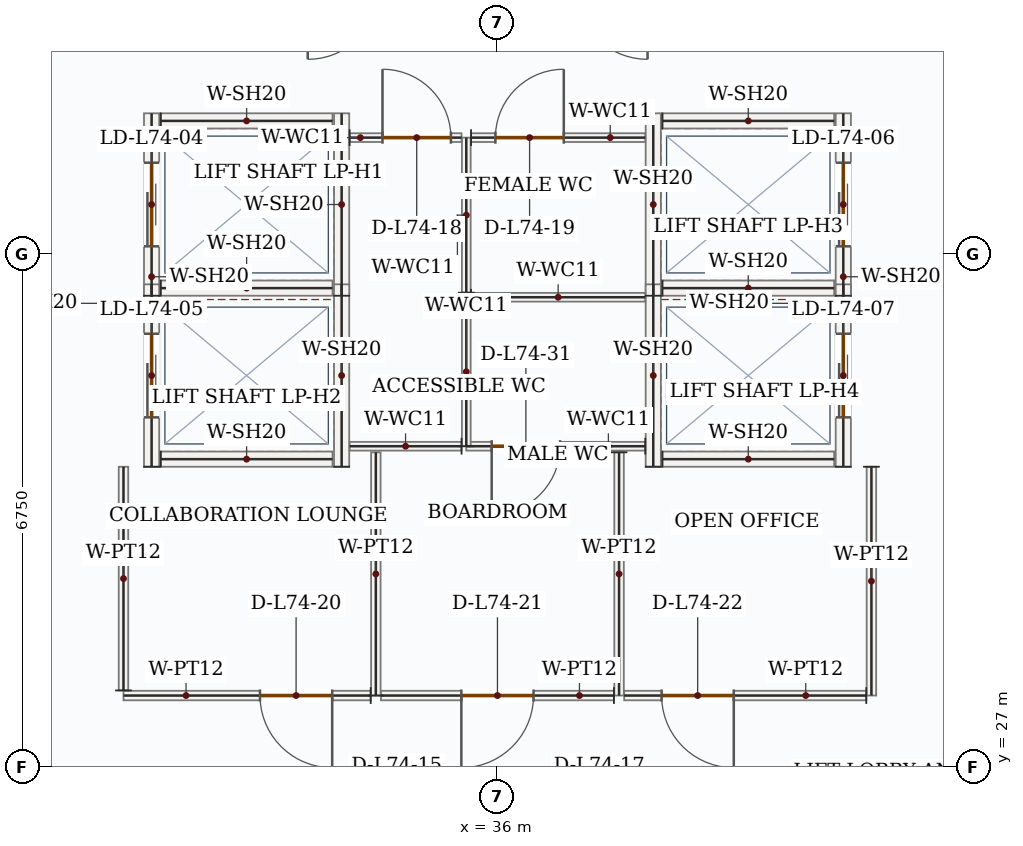
"""IFC4 building model, lengths in metres.
Left out: names, types, materials, properties, quantities, classifications, styles, units other than length and angle.
Written with IfcOpenShell. Run it as: python <this file> out.ifc"""

import sys

from ifc_helpers import new_model, si_unit, direction, frame, frame_2d, origin, place, context, subcontext, project, spatial, rectangle, extrude, source, transform, mapped, element, fill, save


model = new_model("IFC4")
c1 = context("Model", 3, precision=1e-05, world=origin(), true_north=direction((0.0, 1.0)))
c2 = subcontext(c1, "Body", "Model", "MODEL_VIEW")
j1 = project(units=[si_unit("LENGTHUNIT", "METRE"), si_unit("PLANEANGLEUNIT", "RADIAN")], contexts=[c1])
p1 = place(None, origin())
s1 = spatial("IfcSite", under=j1, at=p1, CompositionType="ELEMENT")
p2 = place(p1, origin())
s2 = spatial("IfcBuilding", under=s1, at=p2, CompositionType="ELEMENT")
p3 = place(p2, frame((0.0, 0.0, 306.6)))
s3 = spatial("IfcBuildingStorey", under=s2, at=p3, CompositionType="ELEMENT", Elevation=306.6)
p4 = place(p3, frame((31.45, 33.2, 0.0), z_axis=(0.0, 0.0, 1.0), x_axis=(0.0, 1.0, 0.0)))
e1 = element("IfcWall", 1, at=p4, inside=s3, PredefinedType="SOLIDWALL", context=c2, shape_type="SweptSolid", body=[
    extrude(rectangle(XDim=2.4, YDim=0.2, at=frame_2d((1.2, 0.0))), origin(), (0.0, 0.0, 1.0), 3.5),
])
p5 = place(p4, frame((0.65, 0.0, 0.0)))
e2 = element("IfcOpeningElement", 2, at=p5, cuts=e1, PredefinedType="OPENING", context=c2, shape_type="SweptSolid", body=[
    extrude(rectangle(XDim=1.1, YDim=2.15, at=frame_2d((0.55, 1.075))), frame((0.0, 0.11, 0.0), z_axis=(0.0, -1.0, 0.0), x_axis=(1.0, 0.0, 0.0)), (0.0, 0.0, 1.0), 0.22),
])
m1 = source(origin(), c2, "Body", "SweptSolid", [
    extrude(rectangle(XDim=2.4, YDim=0.2, at=frame_2d((1.2, 0.0))), origin(), (0.0, 0.0, 1.0), 3.5),
])
p6 = place(p3, frame((33.95, 33.2, 0.0), z_axis=(0.0, 0.0, 1.0), x_axis=(0.0, 1.0, 0.0)))
e3 = element("IfcWall", 3, at=p6, inside=s3, PredefinedType="SOLIDWALL", context=c2, shape_type="MappedRepresentation", body=[
    mapped(m1, transform((0.0, 0.0, 0.0), x_axis=(1.0, 0.0, 0.0), y_axis=(0.0, 1.0, 0.0), z_axis=(0.0, 0.0, 1.0), scale=1.0)),
])
m2 = source(origin(), c2, "Body", "SweptSolid", [
    extrude(rectangle(XDim=2.26, YDim=0.2, at=frame_2d((1.13, 0.0))), origin(), (0.0, 0.0, 1.0), 3.5),
])
for number, where, z_axis, x_axis in (
    (4, (31.57, 33.3, 0.0), (0.0, 0.0, 1.0), (1.0, 0.0, 0.0)),
    (5, (31.57, 35.5, 0.0), (0.0, 0.0, 1.0), (1.0, 0.0, 0.0)),
):
    element("IfcWall", number, at=place(p3, frame(where, z_axis=z_axis, x_axis=x_axis)), inside=s3, PredefinedType="SOLIDWALL", context=c2, shape_type="MappedRepresentation", body=[
        mapped(m2, transform((0.0, 0.0, 0.0), x_axis=(1.0, 0.0, 0.0), y_axis=(0.0, 1.0, 0.0), z_axis=(0.0, 0.0, 1.0), scale=1.0)),
    ])
p7 = place(p3, frame((31.45, 30.95, 0.0), z_axis=(0.0, 0.0, 1.0), x_axis=(0.0, 1.0, 0.0)))
e6 = element("IfcWall", 6, at=p7, inside=s3, PredefinedType="SOLIDWALL", context=c2, shape_type="SweptSolid", body=[
    extrude(rectangle(XDim=2.4, YDim=0.2, at=frame_2d((1.2, 0.0))), origin(), (0.0, 0.0, 1.0), 3.5),
])
p8 = place(p7, frame((0.65, 0.0, 0.0)))
e7 = element("IfcOpeningElement", 7, at=p8, cuts=e6, PredefinedType="OPENING", context=c2, shape_type="SweptSolid", body=[
    extrude(rectangle(XDim=1.1, YDim=2.15, at=frame_2d((0.55, 1.075))), frame((0.0, 0.11, 0.0), z_axis=(0.0, -1.0, 0.0), x_axis=(1.0, 0.0, 0.0)), (0.0, 0.0, 1.0), 0.22),
])
p9 = place(p3, frame((33.95, 30.95, 0.0), z_axis=(0.0, 0.0, 1.0), x_axis=(0.0, 1.0, 0.0)))
e8 = element("IfcWall", 8, at=p9, inside=s3, PredefinedType="SOLIDWALL", context=c2, shape_type="MappedRepresentation", body=[
    mapped(m1, transform((0.0, 0.0, 0.0), x_axis=(1.0, 0.0, 0.0), y_axis=(0.0, 1.0, 0.0), z_axis=(0.0, 0.0, 1.0), scale=1.0)),
])
p10 = place(p3, frame((31.57, 31.05, 0.0), z_axis=(0.0, 0.0, 1.0), x_axis=(1.0, 0.0, 0.0)))
e9 = element("IfcWall", 9, at=p10, inside=s3, PredefinedType="SOLIDWALL", context=c2, shape_type="MappedRepresentation", body=[
    mapped(m2, transform((0.0, 0.0, 0.0), x_axis=(1.0, 0.0, 0.0), y_axis=(0.0, 1.0, 0.0), z_axis=(0.0, 0.0, 1.0), scale=1.0)),
])
p11 = place(p3, frame((38.05, 33.2, 0.0), z_axis=(0.0, 0.0, 1.0), x_axis=(0.0, 1.0, 0.0)))
e10 = element("IfcWall", 10, at=p11, inside=s3, PredefinedType="SOLIDWALL", context=c2, shape_type="MappedRepresentation", body=[
    mapped(m1, transform((0.0, 0.0, 0.0), x_axis=(1.0, 0.0, 0.0), y_axis=(0.0, 1.0, 0.0), z_axis=(0.0, 0.0, 1.0), scale=1.0)),
])
p12 = place(p3, frame((40.55, 33.2, 0.0), z_axis=(0.0, 0.0, 1.0), x_axis=(0.0, 1.0, 0.0)))
e11 = element("IfcWall", 11, at=p12, inside=s3, PredefinedType="SOLIDWALL", context=c2, shape_type="SweptSolid", body=[
    extrude(rectangle(XDim=2.4, YDim=0.2, at=frame_2d((1.2, 0.0))), origin(), (0.0, 0.0, 1.0), 3.5),
])
p13 = place(p12, frame((0.65, 0.0, 0.0)))
e12 = element("IfcOpeningElement", 12, at=p13, cuts=e11, PredefinedType="OPENING", context=c2, shape_type="SweptSolid", body=[
    extrude(rectangle(XDim=1.1, YDim=2.15, at=frame_2d((0.55, 1.075))), frame((0.0, 0.11, 0.0), z_axis=(0.0, -1.0, 0.0), x_axis=(1.0, 0.0, 0.0)), (0.0, 0.0, 1.0), 0.22),
])
for number, where, z_axis, x_axis in (
    (13, (38.17, 33.3, 0.0), (0.0, 0.0, 1.0), (1.0, 0.0, 0.0)),
    (14, (38.17, 35.5, 0.0), (0.0, 0.0, 1.0), (1.0, 0.0, 0.0)),
):
    element("IfcWall", number, at=place(p3, frame(where, z_axis=z_axis, x_axis=x_axis)), inside=s3, PredefinedType="SOLIDWALL", context=c2, shape_type="MappedRepresentation", body=[
        mapped(m2, transform((0.0, 0.0, 0.0), x_axis=(1.0, 0.0, 0.0), y_axis=(0.0, 1.0, 0.0), z_axis=(0.0, 0.0, 1.0), scale=1.0)),
    ])
p14 = place(p3, frame((38.05, 30.95, 0.0), z_axis=(0.0, 0.0, 1.0), x_axis=(0.0, 1.0, 0.0)))
e15 = element("IfcWall", 15, at=p14, inside=s3, PredefinedType="SOLIDWALL", context=c2, shape_type="MappedRepresentation", body=[
    mapped(m1, transform((0.0, 0.0, 0.0), x_axis=(1.0, 0.0, 0.0), y_axis=(0.0, 1.0, 0.0), z_axis=(0.0, 0.0, 1.0), scale=1.0)),
])
p15 = place(p3, frame((40.55, 30.95, 0.0), z_axis=(0.0, 0.0, 1.0), x_axis=(0.0, 1.0, 0.0)))
e16 = element("IfcWall", 16, at=p15, inside=s3, PredefinedType="SOLIDWALL", context=c2, shape_type="SweptSolid", body=[
    extrude(rectangle(XDim=2.4, YDim=0.2, at=frame_2d((1.2, 0.0))), origin(), (0.0, 0.0, 1.0), 3.5),
])
p16 = place(p15, frame((0.65, 0.0, 0.0)))
e17 = element("IfcOpeningElement", 17, at=p16, cuts=e16, PredefinedType="OPENING", context=c2, shape_type="SweptSolid", body=[
    extrude(rectangle(XDim=1.1, YDim=2.15, at=frame_2d((0.55, 1.075))), frame((0.0, 0.11, 0.0), z_axis=(0.0, -1.0, 0.0), x_axis=(1.0, 0.0, 0.0)), (0.0, 0.0, 1.0), 0.22),
])
p17 = place(p3, frame((38.17, 31.05, 0.0), z_axis=(0.0, 0.0, 1.0), x_axis=(1.0, 0.0, 0.0)))
e18 = element("IfcWall", 18, at=p17, inside=s3, PredefinedType="SOLIDWALL", context=c2, shape_type="MappedRepresentation", body=[
    mapped(m2, transform((0.0, 0.0, 0.0), x_axis=(1.0, 0.0, 0.0), y_axis=(0.0, 1.0, 0.0), z_axis=(0.0, 0.0, 1.0), scale=1.0)),
])
p18 = place(p3, frame((37.945, 31.22, 0.0), z_axis=(0.0, 0.0, 1.0), x_axis=(-1.0, 0.0, 0.0)))
e19 = element("IfcWall", 19, at=p18, inside=s3, PredefinedType="PARTITIONING", context=c2, shape_type="SweptSolid", body=[
    extrude(rectangle(XDim=2.355, YDim=0.115, at=frame_2d((1.177, 0.0))), origin(), (0.0, 0.0, 1.0), 3.5),
])
p19 = place(p18, frame((1.121, 0.0, 0.0)))
e20 = element("IfcOpeningElement", 20, at=p19, cuts=e19, PredefinedType="OPENING", context=c2, shape_type="SweptSolid", body=[
    extrude(rectangle(XDim=0.9, YDim=2.1, at=frame_2d((0.45, 1.05))), frame((0.0, 0.067, 0.0), z_axis=(0.0, -1.0, 0.0), x_axis=(1.0, 0.0, 0.0)), (0.0, 0.0, 1.0), 0.135),
])
m3 = source(origin(), c2, "Body", "SweptSolid", [
    extrude(rectangle(XDim=1.96, YDim=0.115, at=frame_2d((0.98, 0.0))), origin(), (0.0, 0.0, 1.0), 3.5),
])
p20 = place(p3, frame((35.59, 31.22, 0.0), z_axis=(0.0, 0.0, 1.0), x_axis=(0.0, 1.0, 0.0)))
e21 = element("IfcWall", 21, at=p20, inside=s3, PredefinedType="PARTITIONING", context=c2, shape_type="MappedRepresentation", body=[
    mapped(m3, transform((0.0, 0.0, 0.0), x_axis=(1.0, 0.0, 0.0), y_axis=(0.0, 1.0, 0.0), z_axis=(0.0, 0.0, 1.0), scale=1.0)),
])
m4 = source(origin(), c2, "Body", "SweptSolid", [
    extrude(rectangle(XDim=2.292, YDim=0.115, at=frame_2d((1.146, 0.0))), origin(), (0.0, 0.0, 1.0), 3.5),
])
p21 = place(p3, frame((35.653, 33.18, 0.0), z_axis=(0.0, 0.0, 1.0), x_axis=(1.0, 0.0, 0.0)))
e22 = element("IfcWall", 22, at=p21, inside=s3, PredefinedType="PARTITIONING", context=c2, shape_type="MappedRepresentation", body=[
    mapped(m4, transform((0.0, 0.0, 0.0), x_axis=(1.0, 0.0, 0.0), y_axis=(0.0, 1.0, 0.0), z_axis=(0.0, 0.0, 1.0), scale=1.0)),
])
m5 = source(origin(), c2, "Body", "SweptSolid", [
    extrude(rectangle(XDim=2.04, YDim=0.115, at=frame_2d((1.02, 0.0))), origin(), (0.0, 0.0, 1.0), 3.5),
])
p22 = place(p3, frame((35.59, 33.24, 0.0), z_axis=(0.0, 0.0, 1.0), x_axis=(0.0, 1.0, 0.0)))
e23 = element("IfcWall", 23, at=p22, inside=s3, PredefinedType="PARTITIONING", context=c2, shape_type="MappedRepresentation", body=[
    mapped(m5, transform((0.0, 0.0, 0.0), x_axis=(1.0, 0.0, 0.0), y_axis=(0.0, 1.0, 0.0), z_axis=(0.0, 0.0, 1.0), scale=1.0)),
])
p23 = place(p3, frame((35.653, 35.28, 0.0), z_axis=(0.0, 0.0, 1.0), x_axis=(1.0, 0.0, 0.0)))
e24 = element("IfcWall", 24, at=p23, inside=s3, PredefinedType="PARTITIONING", context=c2, shape_type="SweptSolid", body=[
    extrude(rectangle(XDim=2.292, YDim=0.115, at=frame_2d((1.146, 0.0))), origin(), (0.0, 0.0, 1.0), 3.5),
])
p24 = place(p23, frame((0.32, 0.0, 0.0)))
e25 = element("IfcOpeningElement", 25, at=p24, cuts=e24, PredefinedType="OPENING", context=c2, shape_type="SweptSolid", body=[
    extrude(rectangle(XDim=0.9, YDim=2.1, at=frame_2d((0.45, 1.05))), frame((0.0, 0.067, 0.0), z_axis=(0.0, -1.0, 0.0), x_axis=(1.0, 0.0, 0.0)), (0.0, 0.0, 1.0), 0.135),
])
m6 = source(origin(), c2, "Body", "SweptSolid", [
    extrude(rectangle(XDim=1.473, YDim=0.115, at=frame_2d((0.736, 0.0))), origin(), (0.0, 0.0, 1.0), 3.5),
])
p25 = place(p3, frame((35.528, 31.22, 0.0), z_axis=(0.0, 0.0, 1.0), x_axis=(-1.0, 0.0, 0.0)))
e26 = element("IfcWall", 26, at=p25, inside=s3, PredefinedType="PARTITIONING", context=c2, shape_type="MappedRepresentation", body=[
    mapped(m6, transform((0.0, 0.0, 0.0), x_axis=(1.0, 0.0, 0.0), y_axis=(0.0, 1.0, 0.0), z_axis=(0.0, 0.0, 1.0), scale=1.0)),
])
p26 = place(p3, frame((34.055, 35.28, 0.0), z_axis=(0.0, 0.0, 1.0), x_axis=(1.0, 0.0, 0.0)))
e27 = element("IfcWall", 27, at=p26, inside=s3, PredefinedType="PARTITIONING", context=c2, shape_type="SweptSolid", body=[
    extrude(rectangle(XDim=1.473, YDim=0.115, at=frame_2d((0.736, 0.0))), origin(), (0.0, 0.0, 1.0), 3.5),
])
p27 = place(p26, frame((0.433, 0.0, 0.0)))
e28 = element("IfcOpeningElement", 28, at=p27, cuts=e27, PredefinedType="OPENING", context=c2, shape_type="SweptSolid", body=[
    extrude(rectangle(XDim=0.9, YDim=2.1, at=frame_2d((0.45, 1.05))), frame((0.0, 0.067, 0.0), z_axis=(0.0, -1.0, 0.0), x_axis=(1.0, 0.0, 0.0)), (0.0, 0.0, 1.0), 0.135),
])
m7 = source(origin(), c2, "Body", "SweptSolid", [
    extrude(rectangle(XDim=3.2, YDim=0.125, at=frame_2d((1.6, 0.0))), origin(), (0.0, 0.0, 1.0), 3.5),
])
for number, where, z_axis, x_axis in (
    (29, (34.4, 27.94, 0.0), (0.0, 0.0, 1.0), (0.0, 1.0, 0.0)),
    (30, (37.6, 31.14, 0.0), (0.0, 0.0, 1.0), (0.0, -1.0, 0.0)),
):
    element("IfcWall", number, at=place(p3, frame(where, z_axis=z_axis, x_axis=x_axis)), inside=s3, PredefinedType="PARTITIONING", context=c2, shape_type="MappedRepresentation", body=[
        mapped(m7, transform((0.0, 0.0, 0.0), x_axis=(1.0, 0.0, 0.0), y_axis=(0.0, 1.0, 0.0), z_axis=(0.0, 0.0, 1.0), scale=1.0)),
    ])
p28 = place(p3, frame((37.532, 27.94, 0.0), z_axis=(0.0, 0.0, 1.0), x_axis=(-1.0, 0.0, 0.0)))
e31 = element("IfcWall", 31, at=p28, inside=s3, PredefinedType="PARTITIONING", context=c2, shape_type="SweptSolid", body=[
    extrude(rectangle(XDim=3.065, YDim=0.125, at=frame_2d((1.532, 0.0))), origin(), (0.0, 0.0, 1.0), 3.5),
])
p29 = place(p28, frame((1.058, 0.0, 0.0)))
e32 = element("IfcOpeningElement", 32, at=p29, cuts=e31, PredefinedType="OPENING", context=c2, shape_type="SweptSolid", body=[
    extrude(rectangle(XDim=0.95, YDim=2.15, at=frame_2d((0.475, 1.075))), frame((0.0, 0.073, 0.0), z_axis=(0.0, -1.0, 0.0), x_axis=(1.0, 0.0, 0.0)), (0.0, 0.0, 1.0), 0.145),
])
p30 = place(p3, frame((34.333, 27.94, 0.0), z_axis=(0.0, 0.0, 1.0), x_axis=(-1.0, 0.0, 0.0)))
e33 = element("IfcWall", 33, at=p30, inside=s3, PredefinedType="PARTITIONING", context=c2, shape_type="SweptSolid", body=[
    extrude(rectangle(XDim=3.252, YDim=0.125, at=frame_2d((1.626, 0.0))), origin(), (0.0, 0.0, 1.0), 3.5),
])
p31 = place(p30, frame((0.507, 0.0, 0.0)))
e34 = element("IfcOpeningElement", 34, at=p31, cuts=e33, PredefinedType="OPENING", context=c2, shape_type="SweptSolid", body=[
    extrude(rectangle(XDim=0.95, YDim=2.15, at=frame_2d((0.475, 1.075))), frame((0.0, 0.073, 0.0), z_axis=(0.0, -1.0, 0.0), x_axis=(1.0, 0.0, 0.0)), (0.0, 0.0, 1.0), 0.145),
])
m8 = source(origin(), c2, "Body", "SweptSolid", [
    extrude(rectangle(XDim=2.942, YDim=0.125, at=frame_2d((1.471, 0.0))), origin(), (0.0, 0.0, 1.0), 3.5),
])
p32 = place(p3, frame((31.08, 28.008, 0.0), z_axis=(0.0, 0.0, 1.0), x_axis=(0.0, 1.0, 0.0)))
e35 = element("IfcWall", 35, at=p32, inside=s3, PredefinedType="PARTITIONING", context=c2, shape_type="MappedRepresentation", body=[
    mapped(m8, transform((0.0, 0.0, 0.0), x_axis=(1.0, 0.0, 0.0), y_axis=(0.0, 1.0, 0.0), z_axis=(0.0, 0.0, 1.0), scale=1.0)),
])
m9 = source(origin(), c2, "Body", "SweptSolid", [
    extrude(rectangle(XDim=3.01, YDim=0.125, at=frame_2d((1.505, 0.0))), origin(), (0.0, 0.0, 1.0), 3.5),
])
p33 = place(p3, frame((40.92, 30.95, 0.0), z_axis=(0.0, 0.0, 1.0), x_axis=(0.0, -1.0, 0.0)))
e36 = element("IfcWall", 36, at=p33, inside=s3, PredefinedType="PARTITIONING", context=c2, shape_type="MappedRepresentation", body=[
    mapped(m9, transform((0.0, 0.0, 0.0), x_axis=(1.0, 0.0, 0.0), y_axis=(0.0, 1.0, 0.0), z_axis=(0.0, 0.0, 1.0), scale=1.0)),
])
p34 = place(p3, frame((40.853, 27.94, 0.0), z_axis=(0.0, 0.0, 1.0), x_axis=(-1.0, 0.0, 0.0)))
e37 = element("IfcWall", 37, at=p34, inside=s3, PredefinedType="PARTITIONING", context=c2, shape_type="SweptSolid", body=[
    extrude(rectangle(XDim=3.185, YDim=0.125, at=frame_2d((1.593, 0.0))), origin(), (0.0, 0.0, 1.0), 3.5),
])
p35 = place(p34, frame((1.743, 0.0, 0.0)))
e38 = element("IfcOpeningElement", 38, at=p35, cuts=e37, PredefinedType="OPENING", context=c2, shape_type="SweptSolid", body=[
    extrude(rectangle(XDim=0.95, YDim=2.15, at=frame_2d((0.475, 1.075))), frame((0.0, 0.073, 0.0), z_axis=(0.0, -1.0, 0.0), x_axis=(1.0, 0.0, 0.0)), (0.0, 0.0, 1.0), 0.145),
])
m10 = source(origin(), c2, "Body", "SweptSolid", [
    extrude(rectangle(XDim=1.1, YDim=2.15, at=frame_2d((0.55, 1.075))), frame((0.0, 0.025, 0.0), z_axis=(0.0, -1.0, 0.0), x_axis=(1.0, 0.0, 0.0)), (0.0, 0.0, 1.0), 0.05),
])
p36 = place(p5, origin())
e39 = element("IfcDoor", 39, at=p36, inside=s3, OperationType="DOUBLE_DOOR_SLIDING", PredefinedType="DOOR", context=c2, shape_type="MappedRepresentation", body=[
    mapped(m10, transform((0.0, 0.0, 0.0), x_axis=(1.0, 0.0, 0.0), y_axis=(0.0, 1.0, 0.0), z_axis=(0.0, 0.0, 1.0), scale=1.0)),
])
fill(e2, e39)
p37 = place(p8, origin())
e40 = element("IfcDoor", 40, at=p37, inside=s3, OperationType="DOUBLE_DOOR_SLIDING", PredefinedType="DOOR", context=c2, shape_type="MappedRepresentation", body=[
    mapped(m10, transform((0.0, 0.0, 0.0), x_axis=(1.0, 0.0, 0.0), y_axis=(0.0, 1.0, 0.0), z_axis=(0.0, 0.0, 1.0), scale=1.0)),
])
fill(e7, e40)
p38 = place(p13, origin())
e41 = element("IfcDoor", 41, at=p38, inside=s3, OperationType="DOUBLE_DOOR_SLIDING", PredefinedType="DOOR", context=c2, shape_type="MappedRepresentation", body=[
    mapped(m10, transform((0.0, 0.0, 0.0), x_axis=(1.0, 0.0, 0.0), y_axis=(0.0, 1.0, 0.0), z_axis=(0.0, 0.0, 1.0), scale=1.0)),
])
fill(e12, e41)
p39 = place(p16, origin())
e42 = element("IfcDoor", 42, at=p39, inside=s3, OperationType="DOUBLE_DOOR_SLIDING", PredefinedType="DOOR", context=c2, shape_type="MappedRepresentation", body=[
    mapped(m10, transform((0.0, 0.0, 0.0), x_axis=(1.0, 0.0, 0.0), y_axis=(0.0, 1.0, 0.0), z_axis=(0.0, 0.0, 1.0), scale=1.0)),
])
fill(e17, e42)
m11 = source(origin(), c2, "Body", "SweptSolid", [
    extrude(rectangle(XDim=0.9, YDim=2.1, at=frame_2d((0.45, 1.05))), frame((0.0, 0.025, 0.0), z_axis=(0.0, -1.0, 0.0), x_axis=(1.0, 0.0, 0.0)), (0.0, 0.0, 1.0), 0.05),
])
p40 = place(p27, origin())
e43 = element("IfcDoor", 43, at=p40, inside=s3, OperationType="SINGLE_SWING_LEFT", PredefinedType="DOOR", context=c2, shape_type="MappedRepresentation", body=[
    mapped(m11, transform((0.0, 0.0, 0.0), x_axis=(1.0, 0.0, 0.0), y_axis=(0.0, 1.0, 0.0), z_axis=(0.0, 0.0, 1.0), scale=1.0)),
])
fill(e28, e43)
p41 = place(p24, origin())
e44 = element("IfcDoor", 44, at=p41, inside=s3, OperationType="SINGLE_SWING_RIGHT", PredefinedType="DOOR", context=c2, shape_type="MappedRepresentation", body=[
    mapped(m11, transform((0.0, 0.0, 0.0), x_axis=(1.0, 0.0, 0.0), y_axis=(0.0, 1.0, 0.0), z_axis=(0.0, 0.0, 1.0), scale=1.0)),
])
fill(e25, e44)
m12 = source(origin(), c2, "Body", "SweptSolid", [
    extrude(rectangle(XDim=0.95, YDim=2.15, at=frame_2d((0.475, 1.075))), frame((0.0, 0.025, 0.0), z_axis=(0.0, -1.0, 0.0), x_axis=(1.0, 0.0, 0.0)), (0.0, 0.0, 1.0), 0.05),
])
p42 = place(p31, origin())
e45 = element("IfcDoor", 45, at=p42, inside=s3, OperationType="SINGLE_SWING_LEFT", PredefinedType="DOOR", context=c2, shape_type="MappedRepresentation", body=[
    mapped(m12, transform((0.0, 0.0, 0.0), x_axis=(1.0, 0.0, 0.0), y_axis=(0.0, 1.0, 0.0), z_axis=(0.0, 0.0, 1.0), scale=1.0)),
])
fill(e34, e45)
p43 = place(p29, origin())
e46 = element("IfcDoor", 46, at=p43, inside=s3, OperationType="SINGLE_SWING_RIGHT", PredefinedType="DOOR", context=c2, shape_type="MappedRepresentation", body=[
    mapped(m12, transform((0.0, 0.0, 0.0), x_axis=(1.0, 0.0, 0.0), y_axis=(0.0, 1.0, 0.0), z_axis=(0.0, 0.0, 1.0), scale=1.0)),
])
fill(e32, e46)
p44 = place(p35, origin())
e47 = element("IfcDoor", 47, at=p44, inside=s3, OperationType="SINGLE_SWING_LEFT", PredefinedType="DOOR", context=c2, shape_type="MappedRepresentation", body=[
    mapped(m12, transform((0.0, 0.0, 0.0), x_axis=(1.0, 0.0, 0.0), y_axis=(0.0, 1.0, 0.0), z_axis=(0.0, 0.0, 1.0), scale=1.0)),
])
fill(e38, e47)
p45 = place(p19, origin())
e48 = element("IfcDoor", 48, at=p45, inside=s3, OperationType="SINGLE_SWING_RIGHT", PredefinedType="DOOR", context=c2, shape_type="MappedRepresentation", body=[
    mapped(m11, transform((0.0, 0.0, 0.0), x_axis=(1.0, 0.0, 0.0), y_axis=(0.0, 1.0, 0.0), z_axis=(0.0, 0.0, 1.0), scale=1.0)),
])
fill(e20, e48)
save(model, sys.argv[1])
